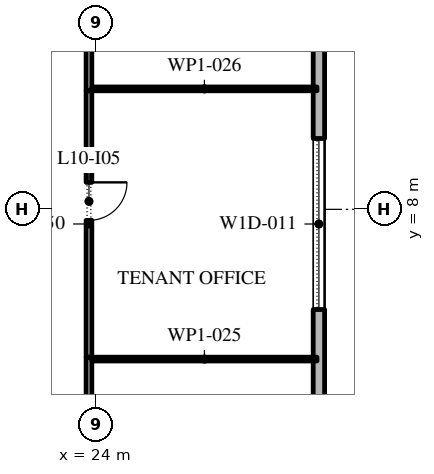
"""IFC4 building model, lengths in metres.
Left out: names, types, materials, properties, quantities, classifications, styles, units other than length and angle.
Written with IfcOpenShell. Run it as: python <this file> out.ifc"""

import sys

from ifc_helpers import new_model, si_unit, direction, frame, frame_2d, origin, place, context, subcontext, project, spatial, rectangle, extrude, element, fill, save


model = new_model("IFC4")
c1 = context("Model", 3, precision=1e-05, world=origin(), true_north=direction((0.0, 1.0)))
c2 = subcontext(c1, "Body", "Model", "MODEL_VIEW")
j1 = project(units=[si_unit("LENGTHUNIT", "METRE"), si_unit("PLANEANGLEUNIT", "RADIAN")], contexts=[c1])
p1 = place(None, origin())
s1 = spatial("IfcSite", under=j1, at=p1, CompositionType="ELEMENT")
p2 = place(p1, origin())
s2 = spatial("IfcBuilding", under=s1, at=p2, CompositionType="ELEMENT")
p3 = place(p2, frame((0.0, 0.0, 52.2)))
s3 = spatial("IfcBuildingStorey", under=s2, at=p3, CompositionType="ELEMENT", Elevation=52.2)
p4 = place(p3, frame((29.85, -24.1, 0.0), z_axis=(0.0, 0.0, 1.0), x_axis=(0.0, 1.0, 0.0)))
e1 = element("IfcWall", 1, at=p4, inside=s3, PredefinedType="STANDARD", context=c2, shape_type="SweptSolid", body=[
    extrude(rectangle(XDim=49.5, YDim=0.3, at=frame_2d((24.75, 0.0))), origin(), (0.0, 0.0, 1.0), 4.0),
])
p5 = place(p4, frame((1.157, 0.0, 0.45)))
e2 = element("IfcOpeningElement", 2, at=p5, cuts=e1, PredefinedType="OPENING", context=c2, shape_type="SweptSolid", body=[
    extrude(rectangle(XDim=4.5, YDim=3.05, at=frame_2d((2.25, 1.525))), frame((0.0, 0.16, 0.0), z_axis=(0.0, -1.0, 0.0), x_axis=(1.0, 0.0, 0.0)), (0.0, 0.0, 1.0), 0.32),
])
p6 = place(p4, frame((8.121, 0.0, 0.45)))
e3 = element("IfcOpeningElement", 3, at=p6, cuts=e1, PredefinedType="OPENING", context=c2, shape_type="SweptSolid", body=[
    extrude(rectangle(XDim=4.5, YDim=2.825, at=frame_2d((2.25, 1.413))), frame((0.0, 0.16, 0.0), z_axis=(0.0, -1.0, 0.0), x_axis=(1.0, 0.0, 0.0)), (0.0, 0.0, 1.0), 0.32),
])
p7 = place(p4, frame((16.286, 0.0, 0.0)))
e4 = element("IfcOpeningElement", 4, at=p7, cuts=e1, PredefinedType="OPENING", context=c2, shape_type="SweptSolid", body=[
    extrude(rectangle(XDim=2.4, YDim=3.325, at=frame_2d((1.2, 1.663))), frame((0.0, 0.16, 0.0), z_axis=(0.0, -1.0, 0.0), x_axis=(1.0, 0.0, 0.0)), (0.0, 0.0, 1.0), 0.32),
])
p8 = place(p4, frame((22.35, 0.0, 0.45)))
e5 = element("IfcOpeningElement", 5, at=p8, cuts=e1, PredefinedType="OPENING", context=c2, shape_type="SweptSolid", body=[
    extrude(rectangle(XDim=4.5, YDim=2.875, at=frame_2d((2.25, 1.438))), frame((0.0, 0.16, 0.0), z_axis=(0.0, -1.0, 0.0), x_axis=(1.0, 0.0, 0.0)), (0.0, 0.0, 1.0), 0.32),
])
p9 = place(p4, frame((29.464, 0.0, 0.45)))
e6 = element("IfcOpeningElement", 6, at=p9, cuts=e1, PredefinedType="OPENING", context=c2, shape_type="SweptSolid", body=[
    extrude(rectangle(XDim=4.5, YDim=2.875, at=frame_2d((2.25, 1.438))), frame((0.0, 0.16, 0.0), z_axis=(0.0, -1.0, 0.0), x_axis=(1.0, 0.0, 0.0)), (0.0, 0.0, 1.0), 0.32),
])
p10 = place(p4, frame((36.579, 0.0, 0.45)))
e7 = element("IfcOpeningElement", 7, at=p10, cuts=e1, PredefinedType="OPENING", context=c2, shape_type="SweptSolid", body=[
    extrude(rectangle(XDim=4.5, YDim=3.05, at=frame_2d((2.25, 1.525))), frame((0.0, 0.16, 0.0), z_axis=(0.0, -1.0, 0.0), x_axis=(1.0, 0.0, 0.0)), (0.0, 0.0, 1.0), 0.32),
])
p11 = place(p4, frame((44.743, 0.0, 0.0)))
e8 = element("IfcOpeningElement", 8, at=p11, cuts=e1, PredefinedType="OPENING", context=c2, shape_type="SweptSolid", body=[
    extrude(rectangle(XDim=2.4, YDim=3.325, at=frame_2d((1.2, 1.663))), frame((0.0, 0.16, 0.0), z_axis=(0.0, -1.0, 0.0), x_axis=(1.0, 0.0, 0.0)), (0.0, 0.0, 1.0), 0.32),
])
p12 = place(p3, frame((23.8, 4.11, 0.0), z_axis=(0.0, 0.0, 1.0), x_axis=(0.0, -1.0, 0.0)))
e9 = element("IfcWall", 9, at=p12, inside=s3, PredefinedType="PARTITIONING", context=c2, shape_type="SweptSolid", body=[
    extrude(rectangle(XDim=14.33, YDim=0.15, at=frame_2d((7.165, 0.0))), origin(), (0.0, 0.0, 1.0), 4.0),
])
p13 = place(p12, frame((6.63, 0.0, 0.0)))
e10 = element("IfcOpeningElement", 10, at=p13, cuts=e9, PredefinedType="OPENING", context=c2, shape_type="SweptSolid", body=[
    extrude(rectangle(XDim=1.0, YDim=2.1, at=frame_2d((0.5, 1.05))), frame((0.0, 0.085, 0.0), z_axis=(0.0, -1.0, 0.0), x_axis=(1.0, 0.0, 0.0)), (0.0, 0.0, 1.0), 0.17),
])
p14 = place(p3, frame((23.8, 11.12, 0.0), z_axis=(0.0, 0.0, 1.0), x_axis=(0.0, -1.0, 0.0)))
e11 = element("IfcWall", 11, at=p14, inside=s3, PredefinedType="PARTITIONING", context=c2, shape_type="SweptSolid", body=[
    extrude(rectangle(XDim=7.01, YDim=0.15, at=frame_2d((3.505, 0.0))), origin(), (0.0, 0.0, 1.0), 4.0),
])
p15 = place(p14, frame((2.41, 0.0, 0.0)))
e12 = element("IfcOpeningElement", 12, at=p15, cuts=e11, PredefinedType="OPENING", context=c2, shape_type="SweptSolid", body=[
    extrude(rectangle(XDim=1.0, YDim=2.1, at=frame_2d((0.5, 1.05))), frame((0.0, 0.085, 0.0), z_axis=(0.0, -1.0, 0.0), x_axis=(1.0, 0.0, 0.0)), (0.0, 0.0, 1.0), 0.17),
])
p16 = place(p3, frame((23.8, 27.2, 0.0), z_axis=(0.0, 0.0, 1.0), x_axis=(0.0, -1.0, 0.0)))
e13 = element("IfcWall", 13, at=p16, inside=s3, PredefinedType="PARTITIONING", context=c2, shape_type="SweptSolid", body=[
    extrude(rectangle(XDim=16.08, YDim=0.15, at=frame_2d((8.04, 0.0))), origin(), (0.0, 0.0, 1.0), 4.0),
])
p17 = place(p16, frame((9.13, 0.0, 0.0)))
e14 = element("IfcOpeningElement", 14, at=p17, cuts=e13, PredefinedType="OPENING", context=c2, shape_type="SweptSolid", body=[
    extrude(rectangle(XDim=1.0, YDim=2.1, at=frame_2d((0.5, 1.05))), frame((0.0, 0.085, 0.0), z_axis=(0.0, -1.0, 0.0), x_axis=(1.0, 0.0, 0.0)), (0.0, 0.0, 1.0), 0.17),
])
for number, where, z_axis, x_axis in (
    (15, (29.8, 4.06, 0.0), (0.0, 0.0, 1.0), (-1.0, 0.0, 0.0)),
    (16, (29.8, 11.17, 0.0), (0.0, 0.0, 1.0), (-1.0, 0.0, 0.0)),
):
    element("IfcWall", number, at=place(p3, frame(where, z_axis=z_axis, x_axis=x_axis)), inside=s3, PredefinedType="PARTITIONING", context=c2, shape_type="SweptSolid", body=[
        extrude(rectangle(XDim=5.925, YDim=0.1, at=frame_2d((2.962, 0.0))), origin(), (0.0, 0.0, 1.0), 4.0),
    ])
p18 = place(p9, origin())
e17 = element("IfcWindow", 17, at=p18, inside=s3, PartitioningType="DOUBLE_PANEL_VERTICAL", PredefinedType="WINDOW", context=c2, shape_type="SweptSolid", body=[
    extrude(rectangle(XDim=4.5, YDim=2.875, at=frame_2d((2.25, 1.438))), frame((0.0, 0.03, 0.0), z_axis=(0.0, -1.0, 0.0), x_axis=(1.0, 0.0, 0.0)), (0.0, 0.0, 1.0), 0.06),
])
fill(e6, e17)
p19 = place(p15, origin())
e18 = element("IfcDoor", 18, at=p19, inside=s3, OperationType="SINGLE_SWING_RIGHT", PredefinedType="DOOR", context=c2, shape_type="SweptSolid", body=[
    extrude(rectangle(XDim=1.0, YDim=2.1, at=frame_2d((0.5, 1.05))), frame((0.0, 0.025, 0.0), z_axis=(0.0, -1.0, 0.0), x_axis=(1.0, 0.0, 0.0)), (0.0, 0.0, 1.0), 0.05),
])
fill(e12, e18)
save(model, sys.argv[1])
